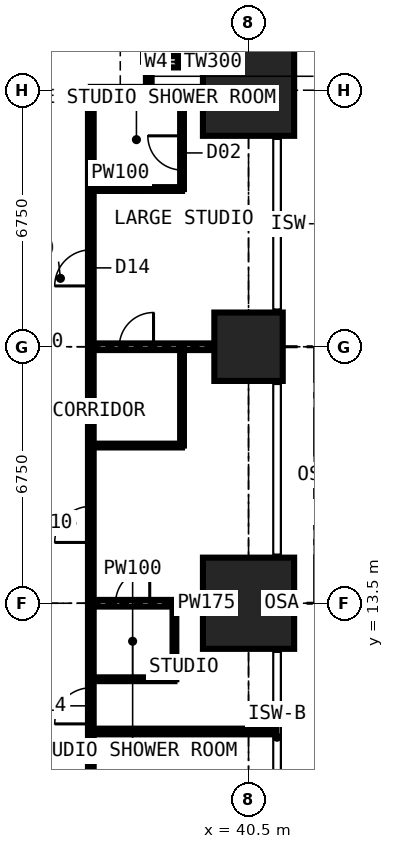
"""IFC4 building model, lengths in metres.
Left out: names, types, materials, properties, quantities, classifications, styles, units other than length and angle.
Written with IfcOpenShell. Run it as: python <this file> out.ifc"""

import sys

from ifc_helpers import new_model, si_unit, direction, frame, frame_2d, origin, origin_2d, place, context, subcontext, project, spatial, rectangle, extrude, element, fill, save


model = new_model("IFC4")
c1 = context("Model", 3, precision=1e-05, world=origin(), true_north=direction((0.0, 1.0)))
c2 = subcontext(c1, "Body", "Model", "MODEL_VIEW")
j1 = project(units=[si_unit("LENGTHUNIT", "METRE"), si_unit("PLANEANGLEUNIT", "RADIAN")], contexts=[c1])
p1 = place(None, origin())
s1 = spatial("IfcSite", under=j1, at=p1, CompositionType="ELEMENT")
p2 = place(p1, origin())
s2 = spatial("IfcBuilding", under=s1, at=p2, CompositionType="ELEMENT")
p3 = place(p2, frame((0.0, 0.0, 83.7)))
s3 = spatial("IfcBuildingStorey", under=s2, at=p3, CompositionType="ELEMENT", Elevation=83.7)
p4 = place(p3, frame((40.5, 13.5, 0.0), z_axis=(0.0, 0.0, 1.0), x_axis=(1.0, 0.0, 0.0)))
e1 = element("IfcColumn", 1, at=p4, inside=s3, PredefinedType="COLUMN", context=c2, shape_type="SweptSolid", body=[
    extrude(rectangle(XDim=2.4, YDim=2.4, at=origin_2d()), origin(), (0.0, 0.0, 1.0), 3.6),
])
p5 = place(p3, frame((40.5, 20.25, 0.0), z_axis=(0.0, 0.0, 1.0), x_axis=(1.0, 0.0, 0.0)))
e2 = element("IfcColumn", 2, at=p5, inside=s3, PredefinedType="COLUMN", context=c2, shape_type="SweptSolid", body=[
    extrude(rectangle(XDim=1.8, YDim=1.8, at=origin_2d()), origin(), (0.0, 0.0, 1.0), 3.6),
])
p6 = place(p3, frame((40.5, 27.0, 0.0), z_axis=(0.0, 0.0, 1.0), x_axis=(1.0, 0.0, 0.0)))
e3 = element("IfcColumn", 3, at=p6, inside=s3, PredefinedType="COLUMN", context=c2, shape_type="SweptSolid", body=[
    extrude(rectangle(XDim=2.4, YDim=2.4, at=origin_2d()), origin(), (0.0, 0.0, 1.0), 3.6),
])
p7 = place(p3, frame((41.25, 27.75, 0.0), z_axis=(0.0, 0.0, 1.0), x_axis=(-1.0, 0.0, 0.0)))
e4 = element("IfcWall", 4, at=p7, inside=s3, PredefinedType="SOLIDWALL", context=c2, shape_type="SweptSolid", body=[
    extrude(rectangle(XDim=3.375, YDim=0.3, at=frame_2d((1.688, 0.0))), origin(), (0.0, 0.0, 1.0), 3.375),
])
p8 = place(p7, frame((1.982, 0.0, 0.9)))
e5 = element("IfcOpeningElement", 5, at=p8, cuts=e4, PredefinedType="OPENING", context=c2, shape_type="SweptSolid", body=[
    extrude(rectangle(XDim=1.2, YDim=1.8, at=frame_2d((0.6, 0.9))), frame((0.0, 0.16, 0.0), z_axis=(0.0, -1.0, 0.0), x_axis=(1.0, 0.0, 0.0)), (0.0, 0.0, 1.0), 0.32),
])
p9 = place(p3, frame((37.875, 27.75, 0.0), z_axis=(0.0, 0.0, 1.0), x_axis=(0.0, 1.0, 0.0)))
e6 = element("IfcWall", 6, at=p9, inside=s3, PredefinedType="SOLIDWALL", context=c2, shape_type="SweptSolid", body=[
    extrude(rectangle(XDim=3.375, YDim=0.3, at=frame_2d((1.688, 0.0))), origin(), (0.0, 0.0, 1.0), 3.375),
])
p10 = place(p9, frame((0.788, 0.0, 0.6)))
e7 = element("IfcOpeningElement", 7, at=p10, cuts=e6, PredefinedType="OPENING", context=c2, shape_type="SweptSolid", body=[
    extrude(rectangle(XDim=1.8, YDim=2.1, at=frame_2d((0.9, 1.05))), frame((0.0, 0.16, 0.0), z_axis=(0.0, -1.0, 0.0), x_axis=(1.0, 0.0, 0.0)), (0.0, 0.0, 1.0), 0.32),
])
p11 = place(p3, frame((36.35, 6.75, 0.0), z_axis=(0.0, 0.0, 1.0), x_axis=(0.0, 1.0, 0.0)))
e8 = element("IfcWall", 8, at=p11, inside=s3, PredefinedType="PARTITIONING", context=c2, shape_type="SweptSolid", body=[
    extrude(rectangle(XDim=20.25, YDim=0.15, at=frame_2d((10.125, 0.0))), origin(), (0.0, 0.0, 1.0), 3.375),
])
p12 = place(p11, frame((15.1, 0.0, 0.0)))
e9 = element("IfcOpeningElement", 9, at=p12, cuts=e8, PredefinedType="OPENING", context=c2, shape_type="SweptSolid", body=[
    extrude(rectangle(XDim=0.95, YDim=2.2, at=frame_2d((0.475, 1.1))), frame((0.0, 0.085, 0.0), z_axis=(0.0, -1.0, 0.0), x_axis=(1.0, 0.0, 0.0)), (0.0, 0.0, 1.0), 0.17),
])
p13 = place(p11, frame((8.35, 0.0, 0.0)))
e10 = element("IfcOpeningElement", 10, at=p13, cuts=e8, PredefinedType="OPENING", context=c2, shape_type="SweptSolid", body=[
    extrude(rectangle(XDim=0.95, YDim=2.2, at=frame_2d((0.475, 1.1))), frame((0.0, 0.085, 0.0), z_axis=(0.0, -1.0, 0.0), x_axis=(1.0, 0.0, 0.0)), (0.0, 0.0, 1.0), 0.17),
])
p14 = place(p11, frame((3.575, 0.0, 0.0)))
e11 = element("IfcOpeningElement", 11, at=p14, cuts=e8, PredefinedType="OPENING", context=c2, shape_type="SweptSolid", body=[
    extrude(rectangle(XDim=0.95, YDim=2.2, at=frame_2d((0.475, 1.1))), frame((0.0, 0.085, 0.0), z_axis=(0.0, -1.0, 0.0), x_axis=(1.0, 0.0, 0.0)), (0.0, 0.0, 1.0), 0.17),
])
p15 = place(p3, frame((36.35, 10.125, 0.0), z_axis=(0.0, 0.0, 1.0), x_axis=(1.0, 0.0, 0.0)))
e12 = element("IfcWall", 12, at=p15, inside=s3, PredefinedType="PARTITIONING", context=c2, shape_type="SweptSolid", body=[
    extrude(rectangle(XDim=4.884, YDim=0.15, at=frame_2d((2.442, 0.0))), origin(), (0.0, 0.0, 1.0), 3.375),
])
p16 = place(p3, frame((36.35, 11.5, 0.0), z_axis=(0.0, 0.0, 1.0), x_axis=(1.0, 0.0, 0.0)))
e13 = element("IfcWall", 13, at=p16, inside=s3, PredefinedType="PARTITIONING", context=c2, shape_type="SweptSolid", body=[
    extrude(rectangle(XDim=2.2, YDim=0.1, at=frame_2d((1.1, 0.0))), origin(), (0.0, 0.0, 1.0), 3.375),
])
p17 = place(p3, frame((36.35, 13.5, 0.0), z_axis=(0.0, 0.0, 1.0), x_axis=(1.0, 0.0, 0.0)))
e14 = element("IfcWall", 14, at=p17, inside=s3, PredefinedType="PARTITIONING", context=c2, shape_type="SweptSolid", body=[
    extrude(rectangle(XDim=4.884, YDim=0.175, at=frame_2d((2.442, 0.0))), origin(), (0.0, 0.0, 1.0), 2.61),
])
p18 = place(p17, frame((0.65, 0.0, 0.0)))
e15 = element("IfcOpeningElement", 15, at=p18, cuts=e14, PredefinedType="OPENING", context=c2, shape_type="SweptSolid", body=[
    extrude(rectangle(XDim=0.9, YDim=2.2, at=frame_2d((0.45, 1.1))), frame((0.0, 0.097, 0.0), z_axis=(0.0, -1.0, 0.0), x_axis=(1.0, 0.0, 0.0)), (0.0, 0.0, 1.0), 0.195),
])
p19 = place(p3, frame((36.35, 17.65, 0.0), z_axis=(0.0, 0.0, 1.0), x_axis=(1.0, 0.0, 0.0)))
e16 = element("IfcWall", 16, at=p19, inside=s3, PredefinedType="PARTITIONING", context=c2, shape_type="SweptSolid", body=[
    extrude(rectangle(XDim=2.4, YDim=0.1, at=frame_2d((1.2, 0.0))), origin(), (0.0, 0.0, 1.0), 3.375),
])
p20 = place(p3, frame((36.35, 20.25, 0.0), z_axis=(0.0, 0.0, 1.0), x_axis=(1.0, 0.0, 0.0)))
e17 = element("IfcWall", 17, at=p20, inside=s3, PredefinedType="PARTITIONING", context=c2, shape_type="SweptSolid", body=[
    extrude(rectangle(XDim=4.884, YDim=0.175, at=frame_2d((2.442, 0.0))), origin(), (0.0, 0.0, 1.0), 2.61),
])
p21 = place(p20, frame((0.75, 0.0, 0.0)))
e18 = element("IfcOpeningElement", 18, at=p21, cuts=e17, PredefinedType="OPENING", context=c2, shape_type="SweptSolid", body=[
    extrude(rectangle(XDim=0.9, YDim=2.2, at=frame_2d((0.45, 1.1))), frame((0.0, 0.097, 0.0), z_axis=(0.0, -1.0, 0.0), x_axis=(1.0, 0.0, 0.0)), (0.0, 0.0, 1.0), 0.195),
])
p22 = place(p3, frame((36.35, 24.4, 0.0), z_axis=(0.0, 0.0, 1.0), x_axis=(1.0, 0.0, 0.0)))
e19 = element("IfcWall", 19, at=p22, inside=s3, PredefinedType="PARTITIONING", context=c2, shape_type="SweptSolid", body=[
    extrude(rectangle(XDim=2.4, YDim=0.1, at=frame_2d((1.2, 0.0))), origin(), (0.0, 0.0, 1.0), 3.375),
])
p23 = place(p3, frame((36.35, 27.0, 0.0), z_axis=(0.0, 0.0, 1.0), x_axis=(1.0, 0.0, 0.0)))
e20 = element("IfcWall", 20, at=p23, inside=s3, PredefinedType="PARTITIONING", context=c2, shape_type="SweptSolid", body=[
    extrude(rectangle(XDim=4.884, YDim=0.175, at=frame_2d((2.442, 0.0))), origin(), (0.0, 0.0, 1.0), 2.877),
])
p24 = place(p3, frame((37.875, 27.0, 0.0), z_axis=(0.0, 0.0, 1.0), x_axis=(0.0, 1.0, 0.0)))
e21 = element("IfcWall", 21, at=p24, inside=s3, PredefinedType="PARTITIONING", context=c2, shape_type="SweptSolid", body=[
    extrude(rectangle(XDim=0.734, YDim=0.15, at=frame_2d((0.367, 0.0))), origin(), (0.0, 0.0, 1.0), 3.375),
])
p25 = place(p3, frame((38.55, 11.5, 0.0), z_axis=(0.0, 0.0, 1.0), x_axis=(0.0, 1.0, 0.0)))
e22 = element("IfcWall", 22, at=p25, inside=s3, PredefinedType="PARTITIONING", context=c2, shape_type="SweptSolid", body=[
    extrude(rectangle(XDim=2.0, YDim=0.1, at=frame_2d((1.0, 0.0))), origin(), (0.0, 0.0, 1.0), 3.375),
])
p26 = place(p3, frame((38.75, 17.65, 0.0), z_axis=(0.0, 0.0, 1.0), x_axis=(0.0, 1.0, 0.0)))
e23 = element("IfcWall", 23, at=p26, inside=s3, PredefinedType="PARTITIONING", context=c2, shape_type="SweptSolid", body=[
    extrude(rectangle(XDim=2.6, YDim=0.1, at=frame_2d((1.3, 0.0))), origin(), (0.0, 0.0, 1.0), 3.375),
])
p27 = place(p3, frame((38.75, 24.4, 0.0), z_axis=(0.0, 0.0, 1.0), x_axis=(0.0, 1.0, 0.0)))
e24 = element("IfcWall", 24, at=p27, inside=s3, PredefinedType="PARTITIONING", context=c2, shape_type="SweptSolid", body=[
    extrude(rectangle(XDim=2.6, YDim=0.1, at=frame_2d((1.3, 0.0))), origin(), (0.0, 0.0, 1.0), 3.375),
])
p28 = place(p27, frame((0.5, 0.0, 0.0)))
e25 = element("IfcOpeningElement", 25, at=p28, cuts=e24, PredefinedType="OPENING", context=c2, shape_type="SweptSolid", body=[
    extrude(rectangle(XDim=0.9, YDim=2.2, at=frame_2d((0.45, 1.1))), frame((0.0, 0.06, 0.0), z_axis=(0.0, -1.0, 0.0), x_axis=(1.0, 0.0, 0.0)), (0.0, 0.0, 1.0), 0.12),
])
p29 = place(p8, origin())
e26 = element("IfcWindow", 26, at=p29, inside=s3, PartitioningType="SINGLE_PANEL", PredefinedType="WINDOW", context=c2, shape_type="SweptSolid", body=[
    extrude(rectangle(XDim=1.2, YDim=1.8, at=frame_2d((0.6, 0.9))), frame((0.0, 0.03, 0.0), z_axis=(0.0, -1.0, 0.0), x_axis=(1.0, 0.0, 0.0)), (0.0, 0.0, 1.0), 0.06),
])
fill(e5, e26)
p30 = place(p12, origin())
e27 = element("IfcDoor", 27, at=p30, inside=s3, OperationType="SINGLE_SWING_LEFT", PredefinedType="DOOR", context=c2, shape_type="SweptSolid", body=[
    extrude(rectangle(XDim=0.95, YDim=2.2, at=frame_2d((0.475, 1.1))), frame((0.0, 0.025, 0.0), z_axis=(0.0, -1.0, 0.0), x_axis=(1.0, 0.0, 0.0)), (0.0, 0.0, 1.0), 0.05),
])
fill(e9, e27)
p31 = place(p28, origin())
e28 = element("IfcDoor", 28, at=p31, inside=s3, OperationType="SINGLE_SWING_RIGHT", PredefinedType="DOOR", context=c2, shape_type="SweptSolid", body=[
    extrude(rectangle(XDim=0.9, YDim=2.2, at=frame_2d((0.45, 1.1))), frame((0.0, 0.025, 0.0), z_axis=(0.0, -1.0, 0.0), x_axis=(1.0, 0.0, 0.0)), (0.0, 0.0, 1.0), 0.05),
])
fill(e25, e28)
p32 = place(p13, origin())
e29 = element("IfcDoor", 29, at=p32, inside=s3, OperationType="SINGLE_SWING_LEFT", PredefinedType="DOOR", context=c2, shape_type="SweptSolid", body=[
    extrude(rectangle(XDim=0.95, YDim=2.2, at=frame_2d((0.475, 1.1))), frame((0.0, 0.025, 0.0), z_axis=(0.0, -1.0, 0.0), x_axis=(1.0, 0.0, 0.0)), (0.0, 0.0, 1.0), 0.05),
])
fill(e10, e29)
p33 = place(p21, origin())
e30 = element("IfcDoor", 30, at=p33, inside=s3, OperationType="SINGLE_SWING_RIGHT", PredefinedType="DOOR", context=c2, shape_type="SweptSolid", body=[
    extrude(rectangle(XDim=0.9, YDim=2.2, at=frame_2d((0.45, 1.1))), frame((0.0, 0.025, 0.0), z_axis=(0.0, -1.0, 0.0), x_axis=(1.0, 0.0, 0.0)), (0.0, 0.0, 1.0), 0.05),
])
fill(e18, e30)
p34 = place(p14, origin())
e31 = element("IfcDoor", 31, at=p34, inside=s3, OperationType="SINGLE_SWING_LEFT", PredefinedType="DOOR", context=c2, shape_type="SweptSolid", body=[
    extrude(rectangle(XDim=0.95, YDim=2.2, at=frame_2d((0.475, 1.1))), frame((0.0, 0.025, 0.0), z_axis=(0.0, -1.0, 0.0), x_axis=(1.0, 0.0, 0.0)), (0.0, 0.0, 1.0), 0.05),
])
fill(e11, e31)
p35 = place(p18, origin())
e32 = element("IfcDoor", 32, at=p35, inside=s3, OperationType="SINGLE_SWING_RIGHT", PredefinedType="DOOR", context=c2, shape_type="SweptSolid", body=[
    extrude(rectangle(XDim=0.9, YDim=2.2, at=frame_2d((0.45, 1.1))), frame((0.0, 0.025, 0.0), z_axis=(0.0, -1.0, 0.0), x_axis=(1.0, 0.0, 0.0)), (0.0, 0.0, 1.0), 0.05),
])
fill(e15, e32)
save(model, sys.argv[1])
